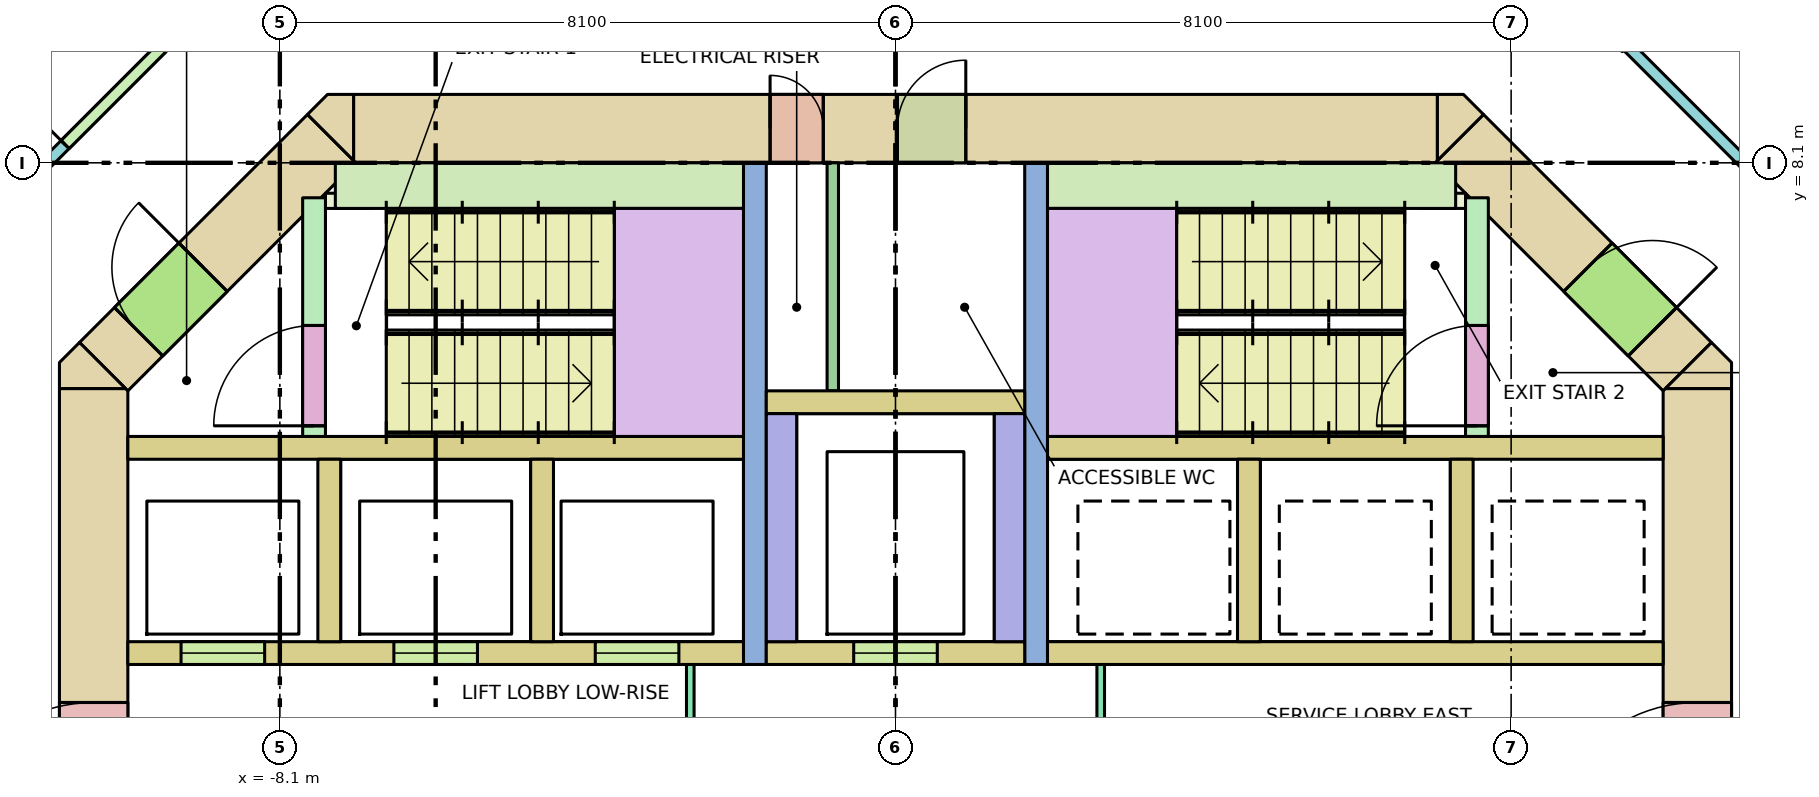
"""IFC4 building model, lengths in metres.
Left out: names, types, materials, properties, quantities, classifications, styles, units other than length and angle.
Written with IfcOpenShell. Run it as: python <this file> out.ifc"""

import sys

from ifc_helpers import new_model, si_unit, direction, frame, frame_2d, origin, place, context, subcontext, project, spatial, polyline, rectangle, outline, extrude, element, fill, save


model = new_model("IFC4")
c1 = context("Model", 3, precision=1e-05, world=origin(), true_north=direction((0.0, 1.0)))
c2 = subcontext(c1, "Body", "Model", "MODEL_VIEW")
j1 = project(units=[si_unit("LENGTHUNIT", "METRE"), si_unit("PLANEANGLEUNIT", "RADIAN")], contexts=[c1])
p1 = place(None, origin())
s1 = spatial("IfcSite", under=j1, at=p1, CompositionType="ELEMENT")
p2 = place(p1, origin())
s2 = spatial("IfcBuilding", under=s1, at=p2, CompositionType="ELEMENT")
p3 = place(p2, frame((0.0, 0.0, 142.8)))
s3 = spatial("IfcBuildingStorey", under=s2, at=p3, CompositionType="ELEMENT", Elevation=142.8)
p4 = place(p3, frame((-7.13, 8.55, -0.28), z_axis=(0.0, 0.0, 1.0), x_axis=(1.0, 0.0, 0.0)))
e1 = element("IfcWall", 1, at=p4, inside=s3, PredefinedType="SHEAR", context=c2, shape_type="SweptSolid", body=[
    extrude(rectangle(XDim=14.26, YDim=0.9, at=frame_2d((7.13, 0.0))), origin(), (0.0, 0.0, 1.0), 3.8),
])
p5 = place(p4, frame((5.48, 0.0, 0.28)))
e2 = element("IfcOpeningElement", 2, at=p5, cuts=e1, PredefinedType="OPENING", context=c2, shape_type="SweptSolid", body=[
    extrude(rectangle(XDim=0.7, YDim=2.1, at=frame_2d((0.35, 1.05))), frame((0.0, 0.46, 0.0), z_axis=(0.0, -1.0, 0.0), x_axis=(1.0, 0.0, 0.0)), (0.0, 0.0, 1.0), 0.92),
])
p6 = place(p4, frame((7.155, 0.0, 0.28)))
e3 = element("IfcOpeningElement", 3, at=p6, cuts=e1, PredefinedType="OPENING", context=c2, shape_type="SweptSolid", body=[
    extrude(rectangle(XDim=0.9, YDim=2.1, at=frame_2d((0.45, 1.05))), frame((0.0, 0.46, 0.0), z_axis=(0.0, -1.0, 0.0), x_axis=(1.0, 0.0, 0.0)), (0.0, 0.0, 1.0), 0.92),
])
p7 = place(p3, frame((-10.55, -5.13, -0.28), z_axis=(0.0, 0.0, 1.0), x_axis=(0.0, 1.0, 0.0)))
e4 = element("IfcWall", 4, at=p7, inside=s3, PredefinedType="SHEAR", context=c2, shape_type="SweptSolid", body=[
    extrude(rectangle(XDim=10.26, YDim=0.9, at=frame_2d((5.13, 0.0))), origin(), (0.0, 0.0, 1.0), 3.8),
])
p8 = place(p7, frame((4.13, 0.0, 0.28)))
e5 = element("IfcOpeningElement", 5, at=p8, cuts=e4, PredefinedType="OPENING", context=c2, shape_type="SweptSolid", body=[
    extrude(rectangle(XDim=2.0, YDim=2.1, at=frame_2d((1.0, 1.05))), frame((0.0, 0.46, 0.0), z_axis=(0.0, -1.0, 0.0), x_axis=(1.0, 0.0, 0.0)), (0.0, 0.0, 1.0), 0.92),
])
p9 = place(p3, frame((10.55, -5.13, -0.28), z_axis=(0.0, 0.0, 1.0), x_axis=(0.0, 1.0, 0.0)))
e6 = element("IfcWall", 6, at=p9, inside=s3, PredefinedType="SHEAR", context=c2, shape_type="SweptSolid", body=[
    extrude(rectangle(XDim=10.26, YDim=0.9, at=frame_2d((5.13, 0.0))), origin(), (0.0, 0.0, 1.0), 3.8),
])
p10 = place(p9, frame((4.13, 0.0, 0.28)))
e7 = element("IfcOpeningElement", 7, at=p10, cuts=e6, PredefinedType="OPENING", context=c2, shape_type="SweptSolid", body=[
    extrude(rectangle(XDim=2.0, YDim=2.1, at=frame_2d((1.0, 1.05))), frame((0.0, 0.46, 0.0), z_axis=(0.0, -1.0, 0.0), x_axis=(1.0, 0.0, 0.0)), (0.0, 0.0, 1.0), 0.92),
])
p11 = place(p3, frame((-10.418, 5.418, -0.28), z_axis=(0.0, 0.0, 1.0), x_axis=(0.707106781187, 0.707106781187, 0.0)))
e8 = element("IfcWall", 8, at=p11, inside=s3, PredefinedType="SHEAR", context=c2, shape_type="SweptSolid", body=[
    extrude(rectangle(XDim=4.243, YDim=0.9, at=frame_2d((2.121, 0.0))), origin(), (0.0, 0.0, 1.0), 3.8),
])
p12 = place(p11, frame((0.65, 0.0, 0.28)))
e9 = element("IfcOpeningElement", 9, at=p12, cuts=e8, PredefinedType="OPENING", context=c2, shape_type="SweptSolid", body=[
    extrude(rectangle(XDim=1.2, YDim=2.1, at=frame_2d((0.6, 1.05))), frame((0.0, 0.46, 0.0), z_axis=(0.0, -1.0, 0.0), x_axis=(1.0, 0.0, 0.0)), (0.0, 0.0, 1.0), 0.92),
])
p13 = place(p3, frame((7.418, 8.418, -0.28), z_axis=(0.0, 0.0, 1.0), x_axis=(0.707106781187, -0.707106781187, 0.0)))
e10 = element("IfcWall", 10, at=p13, inside=s3, PredefinedType="SHEAR", context=c2, shape_type="SweptSolid", body=[
    extrude(rectangle(XDim=4.243, YDim=0.9, at=frame_2d((2.121, 0.0))), origin(), (0.0, 0.0, 1.0), 3.8),
])
p14 = place(p13, frame((2.393, 0.0, 0.28)))
e11 = element("IfcOpeningElement", 11, at=p14, cuts=e10, PredefinedType="OPENING", context=c2, shape_type="SweptSolid", body=[
    extrude(rectangle(XDim=1.2, YDim=2.1, at=frame_2d((0.6, 1.05))), frame((0.0, 0.46, 0.0), z_axis=(0.0, -1.0, 0.0), x_axis=(1.0, 0.0, 0.0)), (0.0, 0.0, 1.0), 0.92),
])
p15 = place(p3, frame((0.0, 0.0, -0.28)))
e12 = element("IfcWall", 12, at=p15, inside=s3, PredefinedType="SHEAR", context=c2, shape_type="SweptSolid", body=[
    extrude(outline(polyline([(-10.736, 5.736), (-10.13, 5.13), (-11.0, 5.13), (-11.0, 5.473), (-10.736, 5.736)])), origin(), (0.0, 0.0, 1.0), 3.8),
])
p16 = place(p3, frame((0.0, 0.0, -0.28)))
e13 = element("IfcWall", 13, at=p16, inside=s3, PredefinedType="SHEAR", context=c2, shape_type="SweptSolid", body=[
    extrude(outline(polyline([(11.0, 5.473), (11.0, 5.13), (10.13, 5.13), (10.736, 5.736), (11.0, 5.473)])), origin(), (0.0, 0.0, 1.0), 3.8),
])
p17 = place(p3, frame((0.0, 0.0, -0.28)))
e14 = element("IfcWall", 14, at=p17, inside=s3, PredefinedType="SHEAR", context=c2, shape_type="SweptSolid", body=[
    extrude(outline(polyline([(-7.473, 9.0), (-7.13, 9.0), (-7.13, 8.13), (-7.736, 8.736), (-7.473, 9.0)])), origin(), (0.0, 0.0, 1.0), 3.8),
])
p18 = place(p3, frame((0.0, 0.0, -0.28)))
e15 = element("IfcWall", 15, at=p18, inside=s3, PredefinedType="SHEAR", context=c2, shape_type="SweptSolid", body=[
    extrude(outline(polyline([(7.473, 9.0), (7.736, 8.736), (7.13, 8.13), (7.13, 9.0), (7.473, 9.0)])), origin(), (0.0, 0.0, 1.0), 3.8),
])
for number, where, z_axis, x_axis in (
    (16, (-10.1, 4.35, 0.0), (0.0, 0.0, 1.0), (1.0, 0.0, 0.0)),
    (17, (2.0, 4.35, 0.0), (0.0, 0.0, 1.0), (1.0, 0.0, 0.0)),
):
    element("IfcWall", number, at=place(p3, frame(where, z_axis=z_axis, x_axis=x_axis)), inside=s3, PredefinedType="SOLIDWALL", context=c2, shape_type="SweptSolid", body=[
        extrude(rectangle(XDim=8.1, YDim=0.3, at=frame_2d((4.05, 0.0))), origin(), (0.0, 0.0, 1.0), 3.52),
    ])
p19 = place(p3, frame((-10.1, 1.65, 0.0), z_axis=(0.0, 0.0, 1.0), x_axis=(1.0, 0.0, 0.0)))
e18 = element("IfcWall", 18, at=p19, inside=s3, PredefinedType="SOLIDWALL", context=c2, shape_type="SweptSolid", body=[
    extrude(rectangle(XDim=8.1, YDim=0.3, at=frame_2d((4.05, 0.0))), origin(), (0.0, 0.0, 1.0), 3.52),
])
p20 = place(p19, frame((0.7, 0.0, 0.0)))
e19 = element("IfcOpeningElement", 19, at=p20, cuts=e18, PredefinedType="OPENING", context=c2, shape_type="SweptSolid", body=[
    extrude(rectangle(XDim=1.1, YDim=2.1, at=frame_2d((0.55, 1.05))), frame((0.0, 0.16, 0.0), z_axis=(0.0, -1.0, 0.0), x_axis=(1.0, 0.0, 0.0)), (0.0, 0.0, 1.0), 0.32),
])
p21 = place(p19, frame((3.5, 0.0, 0.0)))
e20 = element("IfcOpeningElement", 20, at=p21, cuts=e18, PredefinedType="OPENING", context=c2, shape_type="SweptSolid", body=[
    extrude(rectangle(XDim=1.1, YDim=2.1, at=frame_2d((0.55, 1.05))), frame((0.0, 0.16, 0.0), z_axis=(0.0, -1.0, 0.0), x_axis=(1.0, 0.0, 0.0)), (0.0, 0.0, 1.0), 0.32),
])
p22 = place(p19, frame((6.15, 0.0, 0.0)))
e21 = element("IfcOpeningElement", 21, at=p22, cuts=e18, PredefinedType="OPENING", context=c2, shape_type="SweptSolid", body=[
    extrude(rectangle(XDim=1.1, YDim=2.1, at=frame_2d((0.55, 1.05))), frame((0.0, 0.16, 0.0), z_axis=(0.0, -1.0, 0.0), x_axis=(1.0, 0.0, 0.0)), (0.0, 0.0, 1.0), 0.32),
])
p23 = place(p3, frame((2.0, 1.65, 0.0), z_axis=(0.0, 0.0, 1.0), x_axis=(1.0, 0.0, 0.0)))
e22 = element("IfcWall", 22, at=p23, inside=s3, PredefinedType="SOLIDWALL", context=c2, shape_type="SweptSolid", body=[
    extrude(rectangle(XDim=8.1, YDim=0.3, at=frame_2d((4.05, 0.0))), origin(), (0.0, 0.0, 1.0), 3.52),
])
for number, where, z_axis, x_axis in (
    (23, (-7.45, 1.8, 0.0), (0.0, 0.0, 1.0), (0.0, 1.0, 0.0)),
    (24, (-4.65, 1.8, 0.0), (0.0, 0.0, 1.0), (0.0, 1.0, 0.0)),
    (25, (4.65, 1.8, 0.0), (0.0, 0.0, 1.0), (0.0, 1.0, 0.0)),
    (26, (7.45, 1.8, 0.0), (0.0, 0.0, 1.0), (0.0, 1.0, 0.0)),
):
    element("IfcWall", number, at=place(p3, frame(where, z_axis=z_axis, x_axis=x_axis)), inside=s3, PredefinedType="SOLIDWALL", context=c2, shape_type="SweptSolid", body=[
        extrude(rectangle(XDim=2.4, YDim=0.3, at=frame_2d((1.2, 0.0))), origin(), (0.0, 0.0, 1.0), 3.52),
    ])
for number, where, z_axis, x_axis in (
    (27, (-1.85, 1.5, 0.0), (0.0, 0.0, 1.0), (0.0, 1.0, 0.0)),
    (28, (1.85, 1.5, 0.0), (0.0, 0.0, 1.0), (0.0, 1.0, 0.0)),
):
    element("IfcWall", number, at=place(p3, frame(where, z_axis=z_axis, x_axis=x_axis)), inside=s3, PredefinedType="SHEAR", context=c2, shape_type="SweptSolid", body=[
        extrude(rectangle(XDim=6.6, YDim=0.3, at=frame_2d((3.3, 0.0))), origin(), (0.0, 0.0, 1.0), 3.52),
    ])
p24 = place(p3, frame((-1.7, 1.65, 0.0), z_axis=(0.0, 0.0, 1.0), x_axis=(1.0, 0.0, 0.0)))
e29 = element("IfcWall", 29, at=p24, inside=s3, PredefinedType="SOLIDWALL", context=c2, shape_type="SweptSolid", body=[
    extrude(rectangle(XDim=3.4, YDim=0.3, at=frame_2d((1.7, 0.0))), origin(), (0.0, 0.0, 1.0), 3.52),
])
p25 = place(p24, frame((1.15, 0.0, 0.0)))
e30 = element("IfcOpeningElement", 30, at=p25, cuts=e29, PredefinedType="OPENING", context=c2, shape_type="SweptSolid", body=[
    extrude(rectangle(XDim=1.1, YDim=2.1, at=frame_2d((0.55, 1.05))), frame((0.0, 0.16, 0.0), z_axis=(0.0, -1.0, 0.0), x_axis=(1.0, 0.0, 0.0)), (0.0, 0.0, 1.0), 0.32),
])
for number, where, z_axis, x_axis in (
    (31, (-1.5, 1.8, 0.0), (0.0, 0.0, 1.0), (0.0, 1.0, 0.0)),
    (32, (1.5, 1.8, 0.0), (0.0, 0.0, 1.0), (0.0, 1.0, 0.0)),
):
    element("IfcWall", number, at=place(p3, frame(where, z_axis=z_axis, x_axis=x_axis)), inside=s3, PredefinedType="SOLIDWALL", context=c2, shape_type="SweptSolid", body=[
        extrude(rectangle(XDim=3.0, YDim=0.4, at=frame_2d((1.5, 0.0))), origin(), (0.0, 0.0, 1.0), 3.52),
    ])
p26 = place(p3, frame((-1.7, 4.95, 0.0), z_axis=(0.0, 0.0, 1.0), x_axis=(1.0, 0.0, 0.0)))
e33 = element("IfcWall", 33, at=p26, inside=s3, PredefinedType="SOLIDWALL", context=c2, shape_type="SweptSolid", body=[
    extrude(rectangle(XDim=3.4, YDim=0.3, at=frame_2d((1.7, 0.0))), origin(), (0.0, 0.0, 1.0), 3.52),
])
p27 = place(p3, frame((-7.65, 4.5, 0.0), z_axis=(0.0, 0.0, 1.0), x_axis=(0.0, 1.0, 0.0)))
e34 = element("IfcWall", 34, at=p27, inside=s3, PredefinedType="SHEAR", context=c2, shape_type="SweptSolid", body=[
    extrude(rectangle(XDim=3.14, YDim=0.3, at=frame_2d((1.57, 0.0))), origin(), (0.0, 0.0, 1.0), 3.52),
])
p28 = place(p27, frame((0.14, 0.0, 0.0)))
e35 = element("IfcOpeningElement", 35, at=p28, cuts=e34, PredefinedType="OPENING", context=c2, shape_type="SweptSolid", body=[
    extrude(rectangle(XDim=1.32, YDim=2.1, at=frame_2d((0.66, 1.05))), frame((0.0, 0.16, 0.0), z_axis=(0.0, -1.0, 0.0), x_axis=(1.0, 0.0, 0.0)), (0.0, 0.0, 1.0), 0.32),
])
p29 = place(p3, frame((-7.37, 7.8, 0.0), z_axis=(0.0, 0.0, 1.0), x_axis=(1.0, 0.0, 0.0)))
e36 = element("IfcWall", 36, at=p29, inside=s3, PredefinedType="SHEAR", context=c2, shape_type="SweptSolid", body=[
    extrude(rectangle(XDim=5.37, YDim=0.6, at=frame_2d((2.685, 0.0))), origin(), (0.0, 0.0, 1.0), 3.52),
])
p30 = place(p3, frame((7.65, 4.5, 0.0), z_axis=(0.0, 0.0, 1.0), x_axis=(0.0, 1.0, 0.0)))
e37 = element("IfcWall", 37, at=p30, inside=s3, PredefinedType="SHEAR", context=c2, shape_type="SweptSolid", body=[
    extrude(rectangle(XDim=3.14, YDim=0.3, at=frame_2d((1.57, 0.0))), origin(), (0.0, 0.0, 1.0), 3.52),
])
p31 = place(p30, frame((0.14, 0.0, 0.0)))
e38 = element("IfcOpeningElement", 38, at=p31, cuts=e37, PredefinedType="OPENING", context=c2, shape_type="SweptSolid", body=[
    extrude(rectangle(XDim=1.32, YDim=2.1, at=frame_2d((0.66, 1.05))), frame((0.0, 0.16, 0.0), z_axis=(0.0, -1.0, 0.0), x_axis=(1.0, 0.0, 0.0)), (0.0, 0.0, 1.0), 0.32),
])
p32 = place(p3, frame((2.0, 7.8, 0.0), z_axis=(0.0, 0.0, 1.0), x_axis=(1.0, 0.0, 0.0)))
e39 = element("IfcWall", 39, at=p32, inside=s3, PredefinedType="SHEAR", context=c2, shape_type="SweptSolid", body=[
    extrude(rectangle(XDim=5.37, YDim=0.6, at=frame_2d((2.685, 0.0))), origin(), (0.0, 0.0, 1.0), 3.52),
])
for number, where, z_axis, x_axis in (
    (40, (-7.5, 7.6, 0.0), (0.0, 0.0, 1.0), (1.0, 0.0, 0.0)),
    (41, (6.9, 7.6, 0.0), (0.0, 0.0, 1.0), (1.0, 0.0, 0.0)),
):
    element("IfcWall", number, at=place(p3, frame(where, z_axis=z_axis, x_axis=x_axis)), inside=s3, PredefinedType="SHEAR", context=c2, shape_type="SweptSolid", body=[
        extrude(rectangle(XDim=0.6, YDim=0.2, at=frame_2d((0.3, 0.0))), origin(), (0.0, 0.0, 1.0), 3.52),
    ])
p33 = place(p3, frame((-2.7, -1.5, 0.0), z_axis=(0.0, 0.0, 1.0), x_axis=(0.0, 1.0, 0.0)))
e42 = element("IfcWall", 42, at=p33, inside=s3, PredefinedType="PARTITIONING", context=c2, shape_type="SweptSolid", body=[
    extrude(rectangle(XDim=3.0, YDim=0.1, at=frame_2d((1.5, 0.0))), origin(), (0.0, 0.0, 1.0), 3.52),
])
p34 = place(p33, frame((0.9, 0.0, 0.0)))
e43 = element("IfcOpeningElement", 43, at=p34, cuts=e42, PredefinedType="OPENING", context=c2, shape_type="SweptSolid", body=[
    extrude(rectangle(XDim=1.2, YDim=2.1, at=frame_2d((0.6, 1.05))), frame((0.0, 0.06, 0.0), z_axis=(0.0, -1.0, 0.0), x_axis=(1.0, 0.0, 0.0)), (0.0, 0.0, 1.0), 0.12),
])
p35 = place(p3, frame((2.7, -1.5, 0.0), z_axis=(0.0, 0.0, 1.0), x_axis=(0.0, 1.0, 0.0)))
e44 = element("IfcWall", 44, at=p35, inside=s3, PredefinedType="PARTITIONING", context=c2, shape_type="SweptSolid", body=[
    extrude(rectangle(XDim=3.0, YDim=0.1, at=frame_2d((1.5, 0.0))), origin(), (0.0, 0.0, 1.0), 3.52),
])
p36 = place(p35, frame((0.9, 0.0, 0.0)))
e45 = element("IfcOpeningElement", 45, at=p36, cuts=e44, PredefinedType="OPENING", context=c2, shape_type="SweptSolid", body=[
    extrude(rectangle(XDim=1.2, YDim=2.1, at=frame_2d((0.6, 1.05))), frame((0.0, 0.06, 0.0), z_axis=(0.0, -1.0, 0.0), x_axis=(1.0, 0.0, 0.0)), (0.0, 0.0, 1.0), 0.12),
])
p37 = place(p3, frame((-0.825, 5.1, 0.0), z_axis=(0.0, 0.0, 1.0), x_axis=(0.0, 1.0, 0.0)))
e46 = element("IfcWall", 46, at=p37, inside=s3, PredefinedType="PARTITIONING", context=c2, shape_type="SweptSolid", body=[
    extrude(rectangle(XDim=3.0, YDim=0.15, at=frame_2d((1.5, 0.0))), origin(), (0.0, 0.0, 1.0), 3.52),
])
p38 = place(p3, frame((-12.975, 6.291, 0.0), z_axis=(0.0, 0.0, 1.0), x_axis=(0.707125355289, 0.707088206597, 0.0)))
e47 = element("IfcWall", 47, at=p38, inside=s3, PredefinedType="PARTITIONING", context=c2, shape_type="SweptSolid", body=[
    extrude(rectangle(XDim=6.572, YDim=0.15, at=frame_2d((3.286, 0.0))), origin(), (0.0, 0.0, 1.0), 2.62),
])
p39 = place(p38, frame((2.898, 0.0, 0.0)))
e48 = element("IfcOpeningElement", 48, at=p39, cuts=e47, PredefinedType="OPENING", context=c2, shape_type="SweptSolid", body=[
    extrude(rectangle(XDim=1.8, YDim=2.1, at=frame_2d((0.9, 1.05))), frame((0.0, 0.085, 0.0), z_axis=(0.0, -1.0, 0.0), x_axis=(1.0, 0.0, 0.0)), (0.0, 0.0, 1.0), 0.17),
])
p40 = place(p3, frame((9.633, 9.633, 0.0), z_axis=(0.0, 0.0, 1.0), x_axis=(0.707106781187, -0.707106781187, 0.0)))
e49 = element("IfcWall", 49, at=p40, inside=s3, PredefinedType="PARTITIONING", context=c2, shape_type="SweptSolid", body=[
    extrude(rectangle(XDim=2.335, YDim=0.15, at=frame_2d((1.168, 0.0))), origin(), (0.0, 0.0, 1.0), 2.62),
])
p41 = place(p20, origin())
e50 = element("IfcDoor", 50, at=p41, inside=s3, OperationType="DOUBLE_DOOR_SLIDING", PredefinedType="DOOR", context=c2, shape_type="SweptSolid", body=[
    extrude(rectangle(XDim=1.1, YDim=2.1, at=frame_2d((0.55, 1.05))), frame((0.0, 0.025, 0.0), z_axis=(0.0, -1.0, 0.0), x_axis=(1.0, 0.0, 0.0)), (0.0, 0.0, 1.0), 0.05),
])
fill(e19, e50)
p42 = place(p21, origin())
e51 = element("IfcDoor", 51, at=p42, inside=s3, OperationType="DOUBLE_DOOR_SLIDING", PredefinedType="DOOR", context=c2, shape_type="SweptSolid", body=[
    extrude(rectangle(XDim=1.1, YDim=2.1, at=frame_2d((0.55, 1.05))), frame((0.0, 0.025, 0.0), z_axis=(0.0, -1.0, 0.0), x_axis=(1.0, 0.0, 0.0)), (0.0, 0.0, 1.0), 0.05),
])
fill(e20, e51)
p43 = place(p22, origin())
e52 = element("IfcDoor", 52, at=p43, inside=s3, OperationType="DOUBLE_DOOR_SLIDING", PredefinedType="DOOR", context=c2, shape_type="SweptSolid", body=[
    extrude(rectangle(XDim=1.1, YDim=2.1, at=frame_2d((0.55, 1.05))), frame((0.0, 0.025, 0.0), z_axis=(0.0, -1.0, 0.0), x_axis=(1.0, 0.0, 0.0)), (0.0, 0.0, 1.0), 0.05),
])
fill(e21, e52)
p44 = place(p25, origin())
e53 = element("IfcDoor", 53, at=p44, inside=s3, OperationType="DOUBLE_DOOR_SLIDING", PredefinedType="DOOR", context=c2, shape_type="SweptSolid", body=[
    extrude(rectangle(XDim=1.1, YDim=2.1, at=frame_2d((0.55, 1.05))), frame((0.0, 0.025, 0.0), z_axis=(0.0, -1.0, 0.0), x_axis=(1.0, 0.0, 0.0)), (0.0, 0.0, 1.0), 0.05),
])
fill(e30, e53)
p45 = place(p28, origin())
e54 = element("IfcDoor", 54, at=p45, inside=s3, OperationType="DOUBLE_DOOR_SINGLE_SWING", PredefinedType="DOOR", context=c2, shape_type="SweptSolid", body=[
    extrude(rectangle(XDim=1.32, YDim=2.1, at=frame_2d((0.66, 1.05))), frame((0.0, 0.025, 0.0), z_axis=(0.0, -1.0, 0.0), x_axis=(1.0, 0.0, 0.0)), (0.0, 0.0, 1.0), 0.05),
])
fill(e35, e54)
p46 = place(p12, origin())
e55 = element("IfcDoor", 55, at=p46, inside=s3, OperationType="SINGLE_SWING_RIGHT", PredefinedType="DOOR", context=c2, shape_type="SweptSolid", body=[
    extrude(rectangle(XDim=1.2, YDim=2.1, at=frame_2d((0.6, 1.05))), frame((0.0, 0.025, 0.0), z_axis=(0.0, -1.0, 0.0), x_axis=(1.0, 0.0, 0.0)), (0.0, 0.0, 1.0), 0.05),
])
fill(e9, e55)
p47 = place(p31, origin())
e56 = element("IfcDoor", 56, at=p47, inside=s3, OperationType="DOUBLE_DOOR_SINGLE_SWING", PredefinedType="DOOR", context=c2, shape_type="SweptSolid", body=[
    extrude(rectangle(XDim=1.32, YDim=2.1, at=frame_2d((0.66, 1.05))), frame((0.0, 0.025, 0.0), z_axis=(0.0, -1.0, 0.0), x_axis=(1.0, 0.0, 0.0)), (0.0, 0.0, 1.0), 0.05),
])
fill(e38, e56)
p48 = place(p14, origin())
e57 = element("IfcDoor", 57, at=p48, inside=s3, OperationType="SINGLE_SWING_RIGHT", PredefinedType="DOOR", context=c2, shape_type="SweptSolid", body=[
    extrude(rectangle(XDim=1.2, YDim=2.1, at=frame_2d((0.6, 1.05))), frame((0.0, 0.025, 0.0), z_axis=(0.0, -1.0, 0.0), x_axis=(1.0, 0.0, 0.0)), (0.0, 0.0, 1.0), 0.05),
])
fill(e11, e57)
p49 = place(p8, origin())
e58 = element("IfcDoor", 58, at=p49, inside=s3, OperationType="DOUBLE_DOOR_SINGLE_SWING", PredefinedType="DOOR", context=c2, shape_type="SweptSolid", body=[
    extrude(rectangle(XDim=2.0, YDim=2.1, at=frame_2d((1.0, 1.05))), frame((0.0, 0.025, 0.0), z_axis=(0.0, -1.0, 0.0), x_axis=(1.0, 0.0, 0.0)), (0.0, 0.0, 1.0), 0.05),
])
fill(e5, e58)
p50 = place(p10, origin())
e59 = element("IfcDoor", 59, at=p50, inside=s3, OperationType="DOUBLE_DOOR_SINGLE_SWING", PredefinedType="DOOR", context=c2, shape_type="SweptSolid", body=[
    extrude(rectangle(XDim=2.0, YDim=2.1, at=frame_2d((1.0, 1.05))), frame((0.0, 0.025, 0.0), z_axis=(0.0, -1.0, 0.0), x_axis=(1.0, 0.0, 0.0)), (0.0, 0.0, 1.0), 0.05),
])
fill(e7, e59)
p51 = place(p5, origin())
e60 = element("IfcDoor", 60, at=p51, inside=s3, OperationType="SINGLE_SWING_LEFT", PredefinedType="DOOR", context=c2, shape_type="SweptSolid", body=[
    extrude(rectangle(XDim=0.7, YDim=2.1, at=frame_2d((0.35, 1.05))), frame((0.0, 0.025, 0.0), z_axis=(0.0, -1.0, 0.0), x_axis=(1.0, 0.0, 0.0)), (0.0, 0.0, 1.0), 0.05),
])
fill(e2, e60)
p52 = place(p6, origin())
e61 = element("IfcDoor", 61, at=p52, inside=s3, OperationType="SINGLE_SWING_RIGHT", PredefinedType="DOOR", context=c2, shape_type="SweptSolid", body=[
    extrude(rectangle(XDim=0.9, YDim=2.1, at=frame_2d((0.45, 1.05))), frame((0.0, 0.025, 0.0), z_axis=(0.0, -1.0, 0.0), x_axis=(1.0, 0.0, 0.0)), (0.0, 0.0, 1.0), 0.05),
])
fill(e3, e61)
p53 = place(p39, origin())
e62 = element("IfcDoor", 62, at=p53, inside=s3, OperationType="DOUBLE_DOOR_SINGLE_SWING", PredefinedType="DOOR", context=c2, shape_type="SweptSolid", body=[
    extrude(rectangle(XDim=1.8, YDim=2.1, at=frame_2d((0.9, 1.05))), frame((0.0, 0.025, 0.0), z_axis=(0.0, -1.0, 0.0), x_axis=(1.0, 0.0, 0.0)), (0.0, 0.0, 1.0), 0.05),
])
fill(e48, e62)
save(model, sys.argv[1])
